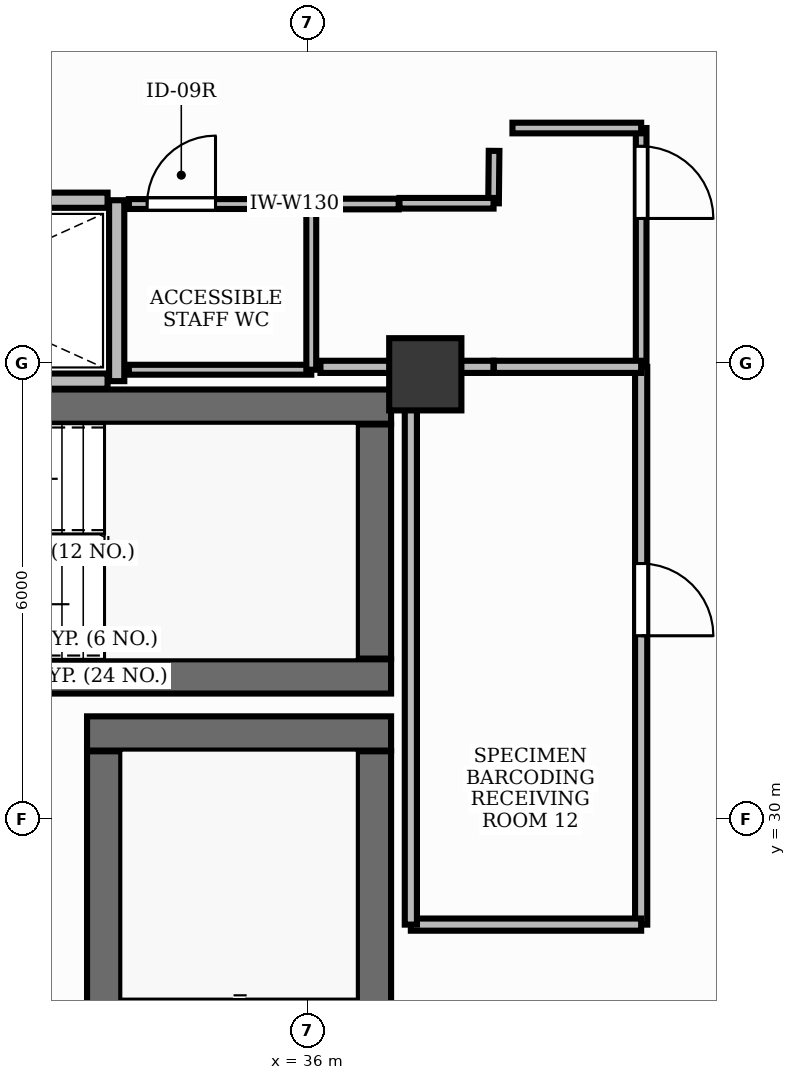
"""IFC4 building model, lengths in metres.
Left out: names, types, materials, properties, quantities, classifications, styles, units other than length and angle.
Written with IfcOpenShell. Run it as: python <this file> out.ifc"""

import sys

from ifc_helpers import new_model, si_unit, direction, frame, frame_2d, origin, origin_2d, place, context, subcontext, project, spatial, rectangle, extrude, element, fill, save


model = new_model("IFC4")
c1 = context("Model", 3, precision=1e-05, world=origin(), true_north=direction((0.0, 1.0)))
c2 = subcontext(c1, "Body", "Model", "MODEL_VIEW")
j1 = project(units=[si_unit("LENGTHUNIT", "METRE"), si_unit("PLANEANGLEUNIT", "RADIAN")], contexts=[c1])
p1 = place(None, origin())
s1 = spatial("IfcSite", under=j1, at=p1, CompositionType="ELEMENT")
p2 = place(p1, origin())
s2 = spatial("IfcBuilding", under=s1, at=p2, CompositionType="ELEMENT")
p3 = place(p2, frame((0.0, 0.0, 55.2)))
s3 = spatial("IfcBuildingStorey", under=s2, at=p3, CompositionType="ELEMENT", Elevation=55.2)
p4 = place(p3, frame((28.852, 35.425, 0.0), z_axis=(0.0, 0.0, 1.0), x_axis=(1.0, 0.0, 0.0)))
e1 = element("IfcWall", 1, at=p4, inside=s3, PredefinedType="SHEAR", context=c2, shape_type="SweptSolid", body=[
    extrude(rectangle(XDim=8.248, YDim=0.45, at=frame_2d((4.124, 0.0))), origin(), (0.0, 0.0, 1.0), 3.9),
])
p5 = place(p3, frame((28.35, 31.875, 0.0), z_axis=(0.0, 0.0, 1.0), x_axis=(1.0, 0.0, 0.0)))
e2 = element("IfcWall", 2, at=p5, inside=s3, PredefinedType="SHEAR", context=c2, shape_type="SweptSolid", body=[
    extrude(rectangle(XDim=8.75, YDim=0.45, at=frame_2d((4.375, 0.0))), origin(), (0.0, 0.0, 1.0), 3.9),
])
p6 = place(p3, frame((36.875, 32.11, 0.0), z_axis=(0.0, 0.0, 1.0), x_axis=(0.0, 1.0, 0.0)))
e3 = element("IfcWall", 3, at=p6, inside=s3, PredefinedType="SHEAR", context=c2, shape_type="SweptSolid", body=[
    extrude(rectangle(XDim=3.08, YDim=0.45, at=frame_2d((1.54, 0.0))), origin(), (0.0, 0.0, 1.0), 3.9),
])
p7 = place(p3, frame((33.1, 31.125, 0.0), z_axis=(0.0, 0.0, 1.0), x_axis=(1.0, 0.0, 0.0)))
e4 = element("IfcWall", 4, at=p7, inside=s3, PredefinedType="SHEAR", context=c2, shape_type="SweptSolid", body=[
    extrude(rectangle(XDim=4.0, YDim=0.45, at=frame_2d((2.0, 0.0))), origin(), (0.0, 0.0, 1.0), 3.9),
])
p8 = place(p3, frame((36.875, 23.11, 0.0), z_axis=(0.0, 0.0, 1.0), x_axis=(0.0, 1.0, 0.0)))
e5 = element("IfcWall", 5, at=p8, inside=s3, PredefinedType="SHEAR", context=c2, shape_type="SweptSolid", body=[
    extrude(rectangle(XDim=7.78, YDim=0.45, at=frame_2d((3.89, 0.0))), origin(), (0.0, 0.0, 1.0), 3.9),
])
p9 = place(p3, frame((33.325, 23.11, 0.0), z_axis=(0.0, 0.0, 1.0), x_axis=(0.0, 1.0, 0.0)))
e6 = element("IfcWall", 6, at=p9, inside=s3, PredefinedType="SHEAR", context=c2, shape_type="SweptSolid", body=[
    extrude(rectangle(XDim=7.78, YDim=0.45, at=frame_2d((3.89, 0.0))), origin(), (0.0, 0.0, 1.0), 3.9),
])
p10 = place(p9, frame((0.2, 0.0, 0.0)))
e7 = element("IfcOpeningElement", 7, at=p10, cuts=e6, PredefinedType="OPENING", context=c2, shape_type="SweptSolid", body=[
    extrude(rectangle(XDim=1.05, YDim=2.15, at=frame_2d((0.525, 1.075))), frame((0.0, 0.24, 0.0), z_axis=(0.0, -1.0, 0.0), x_axis=(1.0, 0.0, 0.0)), (0.0, 0.0, 1.0), 0.48),
])
p11 = place(p3, frame((37.55, 35.85, -0.0), z_axis=(0.0, 0.0, 1.0), x_axis=(1.0, 0.0, 0.0)))
e8 = element("IfcColumn", 8, at=p11, inside=s3, PredefinedType="PILASTER", context=c2, shape_type="SweptSolid", body=[
    extrude(rectangle(XDim=0.95, YDim=0.95, at=origin_2d()), origin(), (0.0, 0.0, 1.0), 3.901),
])
p12 = place(p3, frame((33.49, 35.76, 0.0), z_axis=(0.0, 0.0, 1.0), x_axis=(0.0, 1.0, 0.0)))
e9 = element("IfcWall", 9, at=p12, inside=s3, PredefinedType="PARTITIONING", context=c2, shape_type="SweptSolid", body=[
    extrude(rectangle(XDim=2.38, YDim=0.2, at=frame_2d((1.19, 0.0))), origin(), (0.0, 0.0, 1.0), 2.91),
])
for number, where, z_axis, x_axis in (
    (10, (28.8, 35.76, 0.0), (0.0, 0.0, 1.0), (1.0, 0.0, 0.0)),
    (11, (28.8, 38.14, 0.0), (0.0, 0.0, 1.0), (1.0, 0.0, 0.0)),
):
    element("IfcWall", number, at=place(p3, frame(where, z_axis=z_axis, x_axis=x_axis)), inside=s3, PredefinedType="PARTITIONING", context=c2, shape_type="SweptSolid", body=[
        extrude(rectangle(XDim=4.57, YDim=0.2, at=frame_2d((2.285, 0.0))), origin(), (0.0, 0.0, 1.0), 2.91),
    ])
p13 = place(p3, frame((33.65, 38.09, 0.0), z_axis=(0.0, 0.0, 1.0), x_axis=(1.0, 0.0, 0.0)))
e12 = element("IfcWall", 12, at=p13, inside=s3, PredefinedType="PARTITIONING", context=c2, shape_type="SweptSolid", body=[
    extrude(rectangle(XDim=2.4, YDim=0.13, at=frame_2d((1.2, 0.0))), origin(), (0.0, 0.0, 1.0), 2.91),
])
p14 = place(p13, frame((0.24, 0.0, 0.0)))
e13 = element("IfcOpeningElement", 13, at=p14, cuts=e12, PredefinedType="OPENING", context=c2, shape_type="SweptSolid", body=[
    extrude(rectangle(XDim=0.9, YDim=2.15, at=frame_2d((0.45, 1.075))), frame((0.0, 0.08, 0.0), z_axis=(0.0, -1.0, 0.0), x_axis=(1.0, 0.0, 0.0)), (0.0, 0.0, 1.0), 0.16),
])
p15 = place(p3, frame((40.39, 35.948, 0.0), z_axis=(0.0, 0.0, 1.0), x_axis=(0.0, -1.0, 0.0)))
e14 = element("IfcWall", 14, at=p15, inside=s3, PredefinedType="PARTITIONING", context=c2, shape_type="SweptSolid", body=[
    extrude(rectangle(XDim=7.338, YDim=0.16, at=frame_2d((3.669, 0.0))), origin(), (0.0, 0.0, 1.0), 2.91),
])
p16 = place(p15, frame((2.588, 0.0, 0.0)))
e15 = element("IfcOpeningElement", 15, at=p16, cuts=e14, PredefinedType="OPENING", context=c2, shape_type="SweptSolid", body=[
    extrude(rectangle(XDim=0.95, YDim=2.15, at=frame_2d((0.475, 1.075))), frame((0.0, 0.095, 0.0), z_axis=(0.0, -1.0, 0.0), x_axis=(1.0, 0.0, 0.0)), (0.0, 0.0, 1.0), 0.19),
])
p17 = place(p3, frame((40.39, 39.09, 0.0), z_axis=(0.0, 0.0, 1.0), x_axis=(0.0, -1.0, 0.0)))
e16 = element("IfcWall", 16, at=p17, inside=s3, PredefinedType="PARTITIONING", context=c2, shape_type="SweptSolid", body=[
    extrude(rectangle(XDim=3.132, YDim=0.14, at=frame_2d((1.566, 0.0))), origin(), (0.0, 0.0, 1.0), 2.91),
])
p18 = place(p17, frame((0.24, 0.0, 0.0)))
e17 = element("IfcOpeningElement", 17, at=p18, cuts=e16, PredefinedType="OPENING", context=c2, shape_type="SweptSolid", body=[
    extrude(rectangle(XDim=0.95, YDim=2.15, at=frame_2d((0.475, 1.075))), frame((0.0, 0.085, 0.0), z_axis=(0.0, -1.0, 0.0), x_axis=(1.0, 0.0, 0.0)), (0.0, 0.0, 1.0), 0.17),
])
p19 = place(p3, frame((36.05, 35.91, 0.0), z_axis=(0.0, 0.0, 1.0), x_axis=(-1.0, 0.0, 0.0)))
e18 = element("IfcWall", 18, at=p19, inside=s3, PredefinedType="PARTITIONING", context=c2, shape_type="SweptSolid", body=[
    extrude(rectangle(XDim=2.4, YDim=0.13, at=frame_2d((1.2, 0.0))), origin(), (0.0, 0.0, 1.0), 2.91),
])
p20 = place(p3, frame((36.05, 38.09, 0.0), z_axis=(0.0, 0.0, 1.0), x_axis=(0.0, -1.0, 0.0)))
e19 = element("IfcWall", 19, at=p20, inside=s3, PredefinedType="PARTITIONING", context=c2, shape_type="SweptSolid", body=[
    extrude(rectangle(XDim=2.18, YDim=0.13, at=frame_2d((1.09, 0.0))), origin(), (0.0, 0.0, 1.0), 2.91),
])
p21 = place(p3, frame((36.171, 35.948, 0.0), z_axis=(0.0, 0.0, 1.0), x_axis=(1.0, 0.0, 0.0)))
e20 = element("IfcWall", 20, at=p21, inside=s3, PredefinedType="PARTITIONING", context=c2, shape_type="SweptSolid", body=[
    extrude(rectangle(XDim=2.277, YDim=0.16, at=frame_2d((1.139, 0.0))), origin(), (0.0, 0.0, 1.0), 2.91),
])
p22 = place(p3, frame((38.452, 35.948, 0.0), z_axis=(0.0, 0.0, 1.0), x_axis=(1.0, 0.0, 0.0)))
e21 = element("IfcWall", 21, at=p22, inside=s3, PredefinedType="PARTITIONING", context=c2, shape_type="SweptSolid", body=[
    extrude(rectangle(XDim=1.938, YDim=0.16, at=frame_2d((0.969, 0.0))), origin(), (0.0, 0.0, 1.0), 2.91),
])
p23 = place(p3, frame((40.39, 28.61, 0.0), z_axis=(0.0, 0.0, 1.0), x_axis=(-1.0, 0.0, 0.0)))
e22 = element("IfcWall", 22, at=p23, inside=s3, PredefinedType="PARTITIONING", context=c2, shape_type="SweptSolid", body=[
    extrude(rectangle(XDim=3.03, YDim=0.16, at=frame_2d((1.515, 0.0))), origin(), (0.0, 0.0, 1.0), 2.91),
])
p24 = place(p3, frame((37.36, 28.61, 0.0), z_axis=(0.0, 0.0, 1.0), x_axis=(0.0, 1.0, 0.0)))
e23 = element("IfcWall", 23, at=p24, inside=s3, PredefinedType="PARTITIONING", context=c2, shape_type="SweptSolid", body=[
    extrude(rectangle(XDim=7.29, YDim=0.16, at=frame_2d((3.645, 0.0))), origin(), (0.0, 0.0, 1.0), 2.91),
])
p25 = place(p3, frame((38.455, 38.789, 0.0), z_axis=(0.0, 0.0, 1.0), x_axis=(-0.010272217479, -0.999947239382, 0.0)))
e24 = element("IfcWall", 24, at=p25, inside=s3, PredefinedType="PARTITIONING", context=c2, shape_type="SweptSolid", body=[
    extrude(rectangle(XDim=0.689, YDim=0.14, at=frame_2d((0.345, 0.0))), origin(), (0.0, 0.0, 1.0), 2.91),
])
p26 = place(p3, frame((38.697, 39.09, 0.0), z_axis=(0.0, 0.0, 1.0), x_axis=(1.0, 0.0, 0.0)))
e25 = element("IfcWall", 25, at=p26, inside=s3, PredefinedType="PARTITIONING", context=c2, shape_type="SweptSolid", body=[
    extrude(rectangle(XDim=1.693, YDim=0.14, at=frame_2d((0.847, 0.0))), origin(), (0.0, 0.0, 1.0), 2.91),
])
p27 = place(p3, frame((36.06, 38.09, 0.0), z_axis=(0.0, 0.0, 1.0), x_axis=(1.0, 0.0, 0.0)))
e26 = element("IfcWall", 26, at=p27, inside=s3, PredefinedType="PARTITIONING", context=c2, shape_type="SweptSolid", body=[
    extrude(rectangle(XDim=1.14, YDim=0.14, at=frame_2d((0.57, 0.0))), origin(), (0.0, 0.0, 1.0), 2.91),
])
p28 = place(p3, frame((37.21, 38.1, 0.0), z_axis=(0.0, 0.0, 1.0), x_axis=(1.0, 0.0, 0.0)))
e27 = element("IfcWall", 27, at=p28, inside=s3, PredefinedType="PARTITIONING", context=c2, shape_type="SweptSolid", body=[
    extrude(rectangle(XDim=1.238, YDim=0.14, at=frame_2d((0.619, 0.0))), origin(), (0.0, 0.0, 1.0), 2.91),
])
p29 = place(p14, origin())
e28 = element("IfcDoor", 28, at=p29, inside=s3, OperationType="SINGLE_SWING_RIGHT", PredefinedType="DOOR", context=c2, shape_type="SweptSolid", body=[
    extrude(rectangle(XDim=0.9, YDim=2.15, at=frame_2d((0.45, 1.075))), frame((0.0, 0.025, 0.0), z_axis=(0.0, -1.0, 0.0), x_axis=(1.0, 0.0, 0.0)), (0.0, 0.0, 1.0), 0.05),
])
fill(e13, e28)
p30 = place(p16, origin())
e29 = element("IfcDoor", 29, at=p30, inside=s3, OperationType="SINGLE_SWING_RIGHT", PredefinedType="DOOR", context=c2, shape_type="SweptSolid", body=[
    extrude(rectangle(XDim=0.95, YDim=2.15, at=frame_2d((0.475, 1.075))), frame((0.0, 0.025, 0.0), z_axis=(0.0, -1.0, 0.0), x_axis=(1.0, 0.0, 0.0)), (0.0, 0.0, 1.0), 0.05),
])
fill(e15, e29)
p31 = place(p18, origin())
e30 = element("IfcDoor", 30, at=p31, inside=s3, OperationType="SINGLE_SWING_RIGHT", PredefinedType="DOOR", context=c2, shape_type="SweptSolid", body=[
    extrude(rectangle(XDim=0.95, YDim=2.15, at=frame_2d((0.475, 1.075))), frame((0.0, 0.025, 0.0), z_axis=(0.0, -1.0, 0.0), x_axis=(1.0, 0.0, 0.0)), (0.0, 0.0, 1.0), 0.05),
])
fill(e17, e30)
save(model, sys.argv[1])
